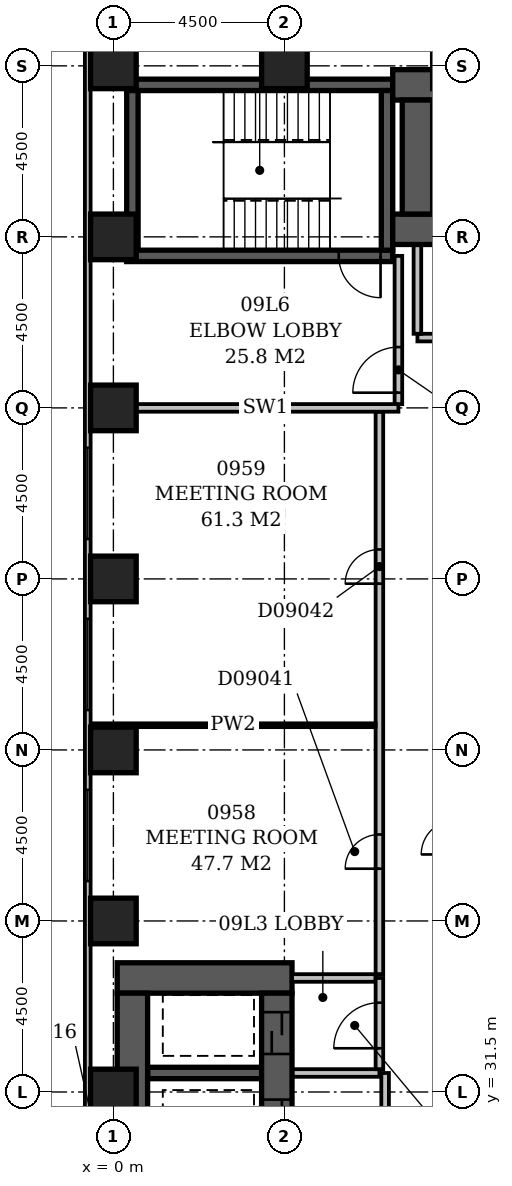
"""IFC4 building model, lengths in metres.
Left out: names, types, materials, properties, quantities, classifications, styles, units other than length and angle.
Written with IfcOpenShell. Run it as: python <this file> out.ifc"""

import sys

from ifc_helpers import new_model, si_unit, direction, frame, frame_2d, origin, origin_2d, place, context, subcontext, project, spatial, rectangle, extrude, element, fill, save


model = new_model("IFC4")
c1 = context("Model", 3, precision=1e-05, world=origin(), true_north=direction((0.0, 1.0)))
c2 = subcontext(c1, "Body", "Model", "MODEL_VIEW")
j1 = project(units=[si_unit("LENGTHUNIT", "METRE"), si_unit("PLANEANGLEUNIT", "RADIAN")], contexts=[c1])
p1 = place(None, origin())
s1 = spatial("IfcSite", under=j1, at=p1, CompositionType="ELEMENT")
p2 = place(p1, origin())
s2 = spatial("IfcBuilding", under=s1, at=p2, CompositionType="ELEMENT")
p3 = place(p2, frame((0.0, 0.0, 43.4)))
s3 = spatial("IfcBuildingStorey", under=s2, at=p3, CompositionType="ELEMENT", Elevation=43.4)
p4 = place(p3, frame((0.1, 34.5, -0.3), z_axis=(0.0, 0.0, 1.0), x_axis=(1.0, 0.0, 0.0)))
e1 = element("IfcWall", 1, at=p4, inside=s3, PredefinedType="SHEAR", context=c2, shape_type="SweptSolid", body=[
    extrude(rectangle(XDim=4.6, YDim=0.8, at=frame_2d((2.3, 0.0))), origin(), (0.0, 0.0, 1.0), 3.6),
])
p5 = place(p3, frame((0.35, 53.5, -0.3), z_axis=(0.0, 0.0, 1.0), x_axis=(1.0, 0.0, 0.0)))
e2 = element("IfcWall", 2, at=p5, inside=s3, PredefinedType="SHEAR", context=c2, shape_type="SweptSolid", body=[
    extrude(rectangle(XDim=7.0, YDim=0.3, at=frame_2d((3.5, 0.0))), origin(), (0.0, 0.0, 1.0), 3.6),
])
p6 = place(p5, frame((5.58, 0.0, 0.3)))
e3 = element("IfcOpeningElement", 3, at=p6, cuts=e2, PredefinedType="OPENING", context=c2, shape_type="SweptSolid", body=[
    extrude(rectangle(XDim=1.1, YDim=2.1, at=frame_2d((0.55, 1.05))), frame((0.0, 0.162, 0.0), z_axis=(0.0, -1.0, 0.0), x_axis=(1.0, 0.0, 0.0)), (0.0, 0.0, 1.0), 0.324),
])
p7 = place(p3, frame((0.35, 58.0, -0.3), z_axis=(0.0, 0.0, 1.0), x_axis=(1.0, 0.0, 0.0)))
e4 = element("IfcWall", 4, at=p7, inside=s3, PredefinedType="SHEAR", context=c2, shape_type="SweptSolid", body=[
    extrude(rectangle(XDim=7.0, YDim=0.3, at=frame_2d((3.5, 0.0))), origin(), (0.0, 0.0, 1.0), 3.6),
])
p8 = place(p3, frame((0.5, 27.15, -0.3), z_axis=(0.0, 0.0, 1.0), x_axis=(0.0, 1.0, 0.0)))
e5 = element("IfcWall", 5, at=p8, inside=s3, PredefinedType="SHEAR", context=c2, shape_type="SweptSolid", body=[
    extrude(rectangle(XDim=6.95, YDim=0.8, at=frame_2d((3.475, 0.0))), origin(), (0.0, 0.0, 1.0), 3.6),
])
p9 = place(p3, frame((0.5, 53.65, -0.3), z_axis=(0.0, 0.0, 1.0), x_axis=(0.0, 1.0, 0.0)))
e6 = element("IfcWall", 6, at=p9, inside=s3, PredefinedType="SHEAR", context=c2, shape_type="SweptSolid", body=[
    extrude(rectangle(XDim=4.2, YDim=0.3, at=frame_2d((2.1, 0.0))), origin(), (0.0, 0.0, 1.0), 3.6),
])
p10 = place(p3, frame((0.9, 32.0, -0.3), z_axis=(0.0, 0.0, 1.0), x_axis=(1.0, 0.0, 0.0)))
e7 = element("IfcWall", 7, at=p10, inside=s3, PredefinedType="SHEAR", context=c2, shape_type="SweptSolid", body=[
    extrude(rectangle(XDim=3.0, YDim=0.3, at=frame_2d((1.5, 0.0))), origin(), (0.0, 0.0, 1.0), 3.6),
])
p11 = place(p3, frame((4.3, 27.15, -0.3), z_axis=(0.0, 0.0, 1.0), x_axis=(0.0, 1.0, 0.0)))
e8 = element("IfcWall", 8, at=p11, inside=s3, PredefinedType="SHEAR", context=c2, shape_type="SweptSolid", body=[
    extrude(rectangle(XDim=6.95, YDim=0.8, at=frame_2d((3.475, 0.0))), origin(), (0.0, 0.0, 1.0), 3.6),
])
p12 = place(p11, frame((3.05, 0.0, 0.3)))
e9 = element("IfcOpeningElement", 9, at=p12, cuts=e8, PredefinedType="OPENING", context=c2, shape_type="SweptSolid", body=[
    extrude(rectangle(XDim=1.1, YDim=2.1, at=frame_2d((0.55, 1.05))), frame((0.0, 0.412, 0.0), z_axis=(0.0, -1.0, 0.0), x_axis=(1.0, 0.0, 0.0)), (0.0, 0.0, 1.0), 0.824),
])
p13 = place(p11, frame((0.55, 0.0, 0.3)))
e10 = element("IfcOpeningElement", 10, at=p13, cuts=e8, PredefinedType="OPENING", context=c2, shape_type="SweptSolid", body=[
    extrude(rectangle(XDim=1.1, YDim=2.1, at=frame_2d((0.55, 1.05))), frame((0.0, 0.412, 0.0), z_axis=(0.0, -1.0, 0.0), x_axis=(1.0, 0.0, 0.0)), (0.0, 0.0, 1.0), 0.824),
])
p14 = place(p11, frame((5.35, 0.0, 0.3)))
e11 = element("IfcOpeningElement", 11, at=p14, cuts=e8, PredefinedType="OPENING", context=c2, shape_type="SweptSolid", body=[
    extrude(rectangle(XDim=1.1, YDim=2.1, at=frame_2d((0.55, 1.05))), frame((0.0, 0.412, 0.0), z_axis=(0.0, -1.0, 0.0), x_axis=(1.0, 0.0, 0.0)), (0.0, 0.0, 1.0), 0.824),
])
p15 = place(p3, frame((7.2, 53.65, -0.3), z_axis=(0.0, 0.0, 1.0), x_axis=(0.0, 1.0, 0.0)))
e12 = element("IfcWall", 12, at=p15, inside=s3, PredefinedType="SHEAR", context=c2, shape_type="SweptSolid", body=[
    extrude(rectangle(XDim=4.2, YDim=0.3, at=frame_2d((2.1, 0.0))), origin(), (0.0, 0.0, 1.0), 3.6),
])
p16 = place(p3, frame((7.35, 54.2, -0.3), z_axis=(0.0, 0.0, 1.0), x_axis=(1.0, 0.0, 0.0)))
e13 = element("IfcWall", 13, at=p16, inside=s3, PredefinedType="SHEAR", context=c2, shape_type="SweptSolid", body=[
    extrude(rectangle(XDim=16.45, YDim=0.8, at=frame_2d((8.225, 0.0))), origin(), (0.0, 0.0, 1.0), 3.6),
])
p17 = place(p16, frame((1.35, 0.0, 0.3)))
e14 = element("IfcOpeningElement", 14, at=p17, cuts=e13, PredefinedType="OPENING", context=c2, shape_type="SweptSolid", body=[
    extrude(rectangle(XDim=1.1, YDim=2.1, at=frame_2d((0.55, 1.05))), frame((0.0, 0.412, 0.0), z_axis=(0.0, -1.0, 0.0), x_axis=(1.0, 0.0, 0.0)), (0.0, 0.0, 1.0), 0.824),
])
p18 = place(p16, frame((3.85, 0.0, 0.3)))
e15 = element("IfcOpeningElement", 15, at=p18, cuts=e13, PredefinedType="OPENING", context=c2, shape_type="SweptSolid", body=[
    extrude(rectangle(XDim=1.1, YDim=2.1, at=frame_2d((0.55, 1.05))), frame((0.0, 0.412, 0.0), z_axis=(0.0, -1.0, 0.0), x_axis=(1.0, 0.0, 0.0)), (0.0, 0.0, 1.0), 0.824),
])
p19 = place(p16, frame((6.35, 0.0, 0.3)))
e16 = element("IfcOpeningElement", 16, at=p19, cuts=e13, PredefinedType="OPENING", context=c2, shape_type="SweptSolid", body=[
    extrude(rectangle(XDim=1.1, YDim=2.1, at=frame_2d((0.55, 1.05))), frame((0.0, 0.412, 0.0), z_axis=(0.0, -1.0, 0.0), x_axis=(1.0, 0.0, 0.0)), (0.0, 0.0, 1.0), 0.824),
])
p20 = place(p16, frame((8.85, 0.0, 0.3)))
e17 = element("IfcOpeningElement", 17, at=p20, cuts=e13, PredefinedType="OPENING", context=c2, shape_type="SweptSolid", body=[
    extrude(rectangle(XDim=1.1, YDim=2.1, at=frame_2d((0.55, 1.05))), frame((0.0, 0.412, 0.0), z_axis=(0.0, -1.0, 0.0), x_axis=(1.0, 0.0, 0.0)), (0.0, 0.0, 1.0), 0.824),
])
p21 = place(p16, frame((11.35, 0.0, 0.3)))
e18 = element("IfcOpeningElement", 18, at=p21, cuts=e13, PredefinedType="OPENING", context=c2, shape_type="SweptSolid", body=[
    extrude(rectangle(XDim=1.1, YDim=2.1, at=frame_2d((0.55, 1.05))), frame((0.0, 0.412, 0.0), z_axis=(0.0, -1.0, 0.0), x_axis=(1.0, 0.0, 0.0)), (0.0, 0.0, 1.0), 0.824),
])
p22 = place(p16, frame((13.85, 0.0, 0.3)))
e19 = element("IfcOpeningElement", 19, at=p22, cuts=e13, PredefinedType="OPENING", context=c2, shape_type="SweptSolid", body=[
    extrude(rectangle(XDim=1.1, YDim=2.1, at=frame_2d((0.55, 1.05))), frame((0.0, 0.412, 0.0), z_axis=(0.0, -1.0, 0.0), x_axis=(1.0, 0.0, 0.0)), (0.0, 0.0, 1.0), 0.824),
])
p23 = place(p3, frame((7.35, 58.0, -0.3), z_axis=(0.0, 0.0, 1.0), x_axis=(1.0, 0.0, 0.0)))
e20 = element("IfcWall", 20, at=p23, inside=s3, PredefinedType="SHEAR", context=c2, shape_type="SweptSolid", body=[
    extrude(rectangle(XDim=16.45, YDim=0.8, at=frame_2d((8.225, 0.0))), origin(), (0.0, 0.0, 1.0), 3.6),
])
p24 = place(p3, frame((8.0, 54.6, -0.3), z_axis=(0.0, 0.0, 1.0), x_axis=(0.0, 1.0, 0.0)))
e21 = element("IfcWall", 21, at=p24, inside=s3, PredefinedType="SHEAR", context=c2, shape_type="SweptSolid", body=[
    extrude(rectangle(XDim=3.0, YDim=0.8, at=frame_2d((1.5, 0.0))), origin(), (0.0, 0.0, 1.0), 3.6),
])
for number, where, z_axis, x_axis in (
    (22, (0.0, 31.5, -0.3), (0.0, 0.0, 1.0), (1.0, 0.0, 0.0)),
    (23, (0.0, 36.0, -0.3), (0.0, 0.0, 1.0), (1.0, 0.0, 0.0)),
    (24, (0.0, 40.5, -0.3), (0.0, 0.0, 1.0), (1.0, 0.0, 0.0)),
    (25, (0.0, 45.0, -0.3), (0.0, 0.0, 1.0), (1.0, 0.0, 0.0)),
    (26, (0.0, 49.5, -0.3), (0.0, 0.0, 1.0), (1.0, 0.0, 0.0)),
    (27, (0.0, 54.0, -0.3), (0.0, 0.0, 1.0), (1.0, 0.0, 0.0)),
    (28, (0.0, 58.5, -0.3), (0.0, 0.0, 1.0), (1.0, 0.0, 0.0)),
    (29, (4.5, 58.5, -0.3), (0.0, 0.0, 1.0), (1.0, 0.0, 0.0)),
):
    element("IfcColumn", number, at=place(p3, frame(where, z_axis=z_axis, x_axis=x_axis)), inside=s3, PredefinedType="COLUMN", context=c2, shape_type="SweptSolid", body=[
        extrude(rectangle(XDim=1.2, YDim=1.2, at=origin_2d()), origin(), (0.0, 0.0, 1.0), 3.6),
    ])
p25 = place(p3, frame((-0.675, 59.1, 0.0), z_axis=(0.0, 0.0, 1.0), x_axis=(0.0, -1.0, 0.0)))
e30 = element("IfcWall", 30, at=p25, inside=s3, PredefinedType="STANDARD", context=c2, shape_type="SweptSolid", body=[
    extrude(rectangle(XDim=55.35, YDim=0.15, at=frame_2d((27.675, 0.0))), origin(), (0.0, 0.0, 1.0), 2.7),
])
p26 = place(p25, frame((10.65, 0.0, 0.6)))
e31 = element("IfcOpeningElement", 31, at=p26, cuts=e30, PredefinedType="OPENING", context=c2, shape_type="SweptSolid", body=[
    extrude(rectangle(XDim=2.4, YDim=1.8, at=frame_2d((1.2, 0.9))), frame((0.0, 0.087, 0.0), z_axis=(0.0, -1.0, 0.0), x_axis=(1.0, 0.0, 0.0)), (0.0, 0.0, 1.0), 0.174),
])
p27 = place(p25, frame((15.15, 0.0, 0.6)))
e32 = element("IfcOpeningElement", 32, at=p27, cuts=e30, PredefinedType="OPENING", context=c2, shape_type="SweptSolid", body=[
    extrude(rectangle(XDim=2.4, YDim=1.8, at=frame_2d((1.2, 0.9))), frame((0.0, 0.087, 0.0), z_axis=(0.0, -1.0, 0.0), x_axis=(1.0, 0.0, 0.0)), (0.0, 0.0, 1.0), 0.174),
])
p28 = place(p25, frame((19.65, 0.0, 0.6)))
e33 = element("IfcOpeningElement", 33, at=p28, cuts=e30, PredefinedType="OPENING", context=c2, shape_type="SweptSolid", body=[
    extrude(rectangle(XDim=2.4, YDim=1.8, at=frame_2d((1.2, 0.9))), frame((0.0, 0.087, 0.0), z_axis=(0.0, -1.0, 0.0), x_axis=(1.0, 0.0, 0.0)), (0.0, 0.0, 1.0), 0.174),
])
p29 = place(p3, frame((8.0, 51.35, 0.0), z_axis=(0.0, 0.0, 1.0), x_axis=(1.0, 0.0, 0.0)))
e34 = element("IfcWall", 34, at=p29, inside=s3, PredefinedType="PARTITIONING", context=c2, shape_type="SweptSolid", body=[
    extrude(rectangle(XDim=15.0, YDim=0.2, at=frame_2d((7.5, 0.0))), origin(), (0.0, 0.0, 1.0), 3.3),
])
p30 = place(p29, frame((3.4, 0.0, 0.0)))
e35 = element("IfcOpeningElement", 35, at=p30, cuts=e34, PredefinedType="OPENING", context=c2, shape_type="SweptSolid", body=[
    extrude(rectangle(XDim=1.2, YDim=2.1, at=frame_2d((0.6, 1.05))), frame((0.0, 0.112, 0.0), z_axis=(0.0, -1.0, 0.0), x_axis=(1.0, 0.0, 0.0)), (0.0, 0.0, 1.0), 0.224),
])
p31 = place(p29, frame((9.4, 0.0, 0.0)))
e36 = element("IfcOpeningElement", 36, at=p31, cuts=e34, PredefinedType="OPENING", context=c2, shape_type="SweptSolid", body=[
    extrude(rectangle(XDim=1.2, YDim=2.1, at=frame_2d((0.6, 1.05))), frame((0.0, 0.112, 0.0), z_axis=(0.0, -1.0, 0.0), x_axis=(1.0, 0.0, 0.0)), (0.0, 0.0, 1.0), 0.224),
])
p32 = place(p3, frame((8.0, 51.45, 0.0), z_axis=(0.0, 0.0, 1.0), x_axis=(0.0, 1.0, 0.0)))
e37 = element("IfcWall", 37, at=p32, inside=s3, PredefinedType="PARTITIONING", context=c2, shape_type="SweptSolid", body=[
    extrude(rectangle(XDim=2.33, YDim=0.2, at=frame_2d((1.165, 0.0))), origin(), (0.0, 0.0, 1.0), 3.3),
])
p33 = place(p3, frame((4.72, 32.0, 0.0), z_axis=(0.0, 0.0, 1.0), x_axis=(1.0, 0.0, 0.0)))
e38 = element("IfcWall", 38, at=p33, inside=s3, PredefinedType="PARTITIONING", context=c2, shape_type="SweptSolid", body=[
    extrude(rectangle(XDim=2.28, YDim=0.2, at=frame_2d((1.14, 0.0))), origin(), (0.0, 0.0, 1.0), 3.3),
])
p34 = place(p3, frame((7.0, 32.1, 0.0), z_axis=(0.0, 0.0, 1.0), x_axis=(0.0, 1.0, 0.0)))
e39 = element("IfcWall", 39, at=p34, inside=s3, PredefinedType="PARTITIONING", context=c2, shape_type="SweptSolid", body=[
    extrude(rectangle(XDim=2.4, YDim=0.2, at=frame_2d((1.2, 0.0))), origin(), (0.0, 0.0, 1.0), 3.3),
])
p35 = place(p34, frame((0.55, 0.0, 0.0)))
e40 = element("IfcOpeningElement", 40, at=p35, cuts=e39, PredefinedType="OPENING", context=c2, shape_type="SweptSolid", body=[
    extrude(rectangle(XDim=1.2, YDim=2.1, at=frame_2d((0.6, 1.05))), frame((0.0, 0.112, 0.0), z_axis=(0.0, -1.0, 0.0), x_axis=(1.0, 0.0, 0.0)), (0.0, 0.0, 1.0), 0.224),
])
p36 = place(p3, frame((4.7, 34.5, 0.0), z_axis=(0.0, 0.0, 1.0), x_axis=(1.0, 0.0, 0.0)))
e41 = element("IfcWall", 41, at=p36, inside=s3, PredefinedType="PARTITIONING", context=c2, shape_type="SweptSolid", body=[
    extrude(rectangle(XDim=2.2, YDim=0.2, at=frame_2d((1.1, 0.0))), origin(), (0.0, 0.0, 1.0), 3.3),
])
p37 = place(p3, frame((7.15, 27.17, 0.0), z_axis=(0.0, 0.0, 1.0), x_axis=(0.0, 1.0, 0.0)))
e42 = element("IfcWall", 42, at=p37, inside=s3, PredefinedType="PARTITIONING", context=c2, shape_type="SweptSolid", body=[
    extrude(rectangle(XDim=4.83, YDim=0.2, at=frame_2d((2.415, 0.0))), origin(), (0.0, 0.0, 1.0), 3.3),
])
p38 = place(p37, frame((1.73, 0.0, 0.0)))
e43 = element("IfcOpeningElement", 43, at=p38, cuts=e42, PredefinedType="OPENING", context=c2, shape_type="SweptSolid", body=[
    extrude(rectangle(XDim=1.2, YDim=2.1, at=frame_2d((0.6, 1.05))), frame((0.0, 0.112, 0.0), z_axis=(0.0, -1.0, 0.0), x_axis=(1.0, 0.0, 0.0)), (0.0, 0.0, 1.0), 0.224),
])
p39 = place(p3, frame((0.5, 49.5, 0.0), z_axis=(0.0, 0.0, 1.0), x_axis=(1.0, 0.0, 0.0)))
e44 = element("IfcWall", 44, at=p39, inside=s3, PredefinedType="PARTITIONING", context=c2, shape_type="SweptSolid", body=[
    extrude(rectangle(XDim=7.0, YDim=0.2, at=frame_2d((3.5, 0.0))), origin(), (0.0, 0.0, 1.0), 3.3),
])
p40 = place(p3, frame((7.5, 49.6, 0.0), z_axis=(0.0, 0.0, 1.0), x_axis=(0.0, 1.0, 0.0)))
e45 = element("IfcWall", 45, at=p40, inside=s3, PredefinedType="PARTITIONING", context=c2, shape_type="SweptSolid", body=[
    extrude(rectangle(XDim=3.9, YDim=0.2, at=frame_2d((1.95, 0.0))), origin(), (0.0, 0.0, 1.0), 3.3),
])
p41 = place(p40, frame((0.3, 0.0, 0.0)))
e46 = element("IfcOpeningElement", 46, at=p41, cuts=e45, PredefinedType="OPENING", context=c2, shape_type="SweptSolid", body=[
    extrude(rectangle(XDim=1.2, YDim=2.1, at=frame_2d((0.6, 1.05))), frame((0.0, 0.112, 0.0), z_axis=(0.0, -1.0, 0.0), x_axis=(1.0, 0.0, 0.0)), (0.0, 0.0, 1.0), 0.224),
])
p42 = place(p3, frame((7.0, 34.6, 0.0), z_axis=(0.0, 0.0, 1.0), x_axis=(0.0, 1.0, 0.0)))
e47 = element("IfcWall", 47, at=p42, inside=s3, PredefinedType="PARTITIONING", context=c2, shape_type="SweptSolid", body=[
    extrude(rectangle(XDim=14.8, YDim=0.2, at=frame_2d((7.4, 0.0))), origin(), (0.0, 0.0, 1.0), 3.3),
])
p43 = place(p42, frame((2.775, 0.0, 0.0)))
e48 = element("IfcOpeningElement", 48, at=p43, cuts=e47, PredefinedType="OPENING", context=c2, shape_type="SweptSolid", body=[
    extrude(rectangle(XDim=0.9, YDim=2.1, at=frame_2d((0.45, 1.05))), frame((0.0, 0.112, 0.0), z_axis=(0.0, -1.0, 0.0), x_axis=(1.0, 0.0, 0.0)), (0.0, 0.0, 1.0), 0.224),
])
p44 = place(p42, frame((10.275, 0.0, 0.0)))
e49 = element("IfcOpeningElement", 49, at=p44, cuts=e47, PredefinedType="OPENING", context=c2, shape_type="SweptSolid", body=[
    extrude(rectangle(XDim=0.9, YDim=2.1, at=frame_2d((0.45, 1.05))), frame((0.0, 0.112, 0.0), z_axis=(0.0, -1.0, 0.0), x_axis=(1.0, 0.0, 0.0)), (0.0, 0.0, 1.0), 0.224),
])
p45 = place(p3, frame((-0.6, 41.15, 0.0), z_axis=(0.0, 0.0, 1.0), x_axis=(1.0, 0.0, 0.0)))
e50 = element("IfcWall", 50, at=p45, inside=s3, PredefinedType="PARTITIONING", context=c2, shape_type="SweptSolid", body=[
    extrude(rectangle(XDim=7.5, YDim=0.1, at=frame_2d((3.75, 0.0))), origin(), (0.0, 0.0, 1.0), 3.3),
])
p46 = place(p26, origin())
e51 = element("IfcWindow", 51, at=p46, inside=s3, PartitioningType="SINGLE_PANEL", PredefinedType="WINDOW", context=c2, shape_type="SweptSolid", body=[
    extrude(rectangle(XDim=2.4, YDim=1.8, at=frame_2d((1.2, 0.9))), frame((0.0, 0.03, 0.0), z_axis=(0.0, -1.0, 0.0), x_axis=(1.0, 0.0, 0.0)), (0.0, 0.0, 1.0), 0.06),
])
fill(e31, e51)
p47 = place(p27, origin())
e52 = element("IfcWindow", 52, at=p47, inside=s3, PartitioningType="SINGLE_PANEL", PredefinedType="WINDOW", context=c2, shape_type="SweptSolid", body=[
    extrude(rectangle(XDim=2.4, YDim=1.8, at=frame_2d((1.2, 0.9))), frame((0.0, 0.03, 0.0), z_axis=(0.0, -1.0, 0.0), x_axis=(1.0, 0.0, 0.0)), (0.0, 0.0, 1.0), 0.06),
])
fill(e32, e52)
p48 = place(p28, origin())
e53 = element("IfcWindow", 53, at=p48, inside=s3, PartitioningType="SINGLE_PANEL", PredefinedType="WINDOW", context=c2, shape_type="SweptSolid", body=[
    extrude(rectangle(XDim=2.4, YDim=1.8, at=frame_2d((1.2, 0.9))), frame((0.0, 0.03, 0.0), z_axis=(0.0, -1.0, 0.0), x_axis=(1.0, 0.0, 0.0)), (0.0, 0.0, 1.0), 0.06),
])
fill(e33, e53)
p49 = place(p41, origin())
e54 = element("IfcDoor", 54, at=p49, inside=s3, OperationType="SINGLE_SWING_LEFT", PredefinedType="DOOR", context=c2, shape_type="SweptSolid", body=[
    extrude(rectangle(XDim=1.2, YDim=2.1, at=frame_2d((0.6, 1.05))), frame((0.0, 0.025, 0.0), z_axis=(0.0, -1.0, 0.0), x_axis=(1.0, 0.0, 0.0)), (0.0, 0.0, 1.0), 0.05),
])
fill(e46, e54)
p50 = place(p12, origin())
e55 = element("IfcDoor", 55, at=p50, inside=s3, OperationType="SLIDING_TO_LEFT", PredefinedType="DOOR", context=c2, shape_type="SweptSolid", body=[
    extrude(rectangle(XDim=1.1, YDim=2.1, at=frame_2d((0.55, 1.05))), frame((0.0, 0.025, 0.0), z_axis=(0.0, -1.0, 0.0), x_axis=(1.0, 0.0, 0.0)), (0.0, 0.0, 1.0), 0.05),
])
fill(e9, e55)
p51 = place(p35, origin())
e56 = element("IfcDoor", 56, at=p51, inside=s3, OperationType="SINGLE_SWING_LEFT", PredefinedType="DOOR", context=c2, shape_type="SweptSolid", body=[
    extrude(rectangle(XDim=1.2, YDim=2.1, at=frame_2d((0.6, 1.05))), frame((0.0, 0.025, 0.0), z_axis=(0.0, -1.0, 0.0), x_axis=(1.0, 0.0, 0.0)), (0.0, 0.0, 1.0), 0.05),
])
fill(e40, e56)
p52 = place(p14, origin())
e57 = element("IfcDoor", 57, at=p52, inside=s3, OperationType="SLIDING_TO_LEFT", PredefinedType="DOOR", context=c2, shape_type="SweptSolid", body=[
    extrude(rectangle(XDim=1.1, YDim=2.1, at=frame_2d((0.55, 1.05))), frame((0.0, 0.025, 0.0), z_axis=(0.0, -1.0, 0.0), x_axis=(1.0, 0.0, 0.0)), (0.0, 0.0, 1.0), 0.05),
])
fill(e11, e57)
p53 = place(p6, origin())
e58 = element("IfcDoor", 58, at=p53, inside=s3, OperationType="SINGLE_SWING_RIGHT", PredefinedType="DOOR", context=c2, shape_type="SweptSolid", body=[
    extrude(rectangle(XDim=1.1, YDim=2.1, at=frame_2d((0.55, 1.05))), frame((0.0, 0.025, 0.0), z_axis=(0.0, -1.0, 0.0), x_axis=(1.0, 0.0, 0.0)), (0.0, 0.0, 1.0), 0.05),
])
fill(e3, e58)
p54 = place(p43, origin())
e59 = element("IfcDoor", 59, at=p54, inside=s3, OperationType="SINGLE_SWING_LEFT", PredefinedType="DOOR", context=c2, shape_type="SweptSolid", body=[
    extrude(rectangle(XDim=0.9, YDim=2.1, at=frame_2d((0.45, 1.05))), frame((0.0, 0.025, 0.0), z_axis=(0.0, -1.0, 0.0), x_axis=(1.0, 0.0, 0.0)), (0.0, 0.0, 1.0), 0.05),
])
fill(e48, e59)
p55 = place(p44, origin())
e60 = element("IfcDoor", 60, at=p55, inside=s3, OperationType="SINGLE_SWING_LEFT", PredefinedType="DOOR", context=c2, shape_type="SweptSolid", body=[
    extrude(rectangle(XDim=0.9, YDim=2.1, at=frame_2d((0.45, 1.05))), frame((0.0, 0.025, 0.0), z_axis=(0.0, -1.0, 0.0), x_axis=(1.0, 0.0, 0.0)), (0.0, 0.0, 1.0), 0.05),
])
fill(e49, e60)
save(model, sys.argv[1])
